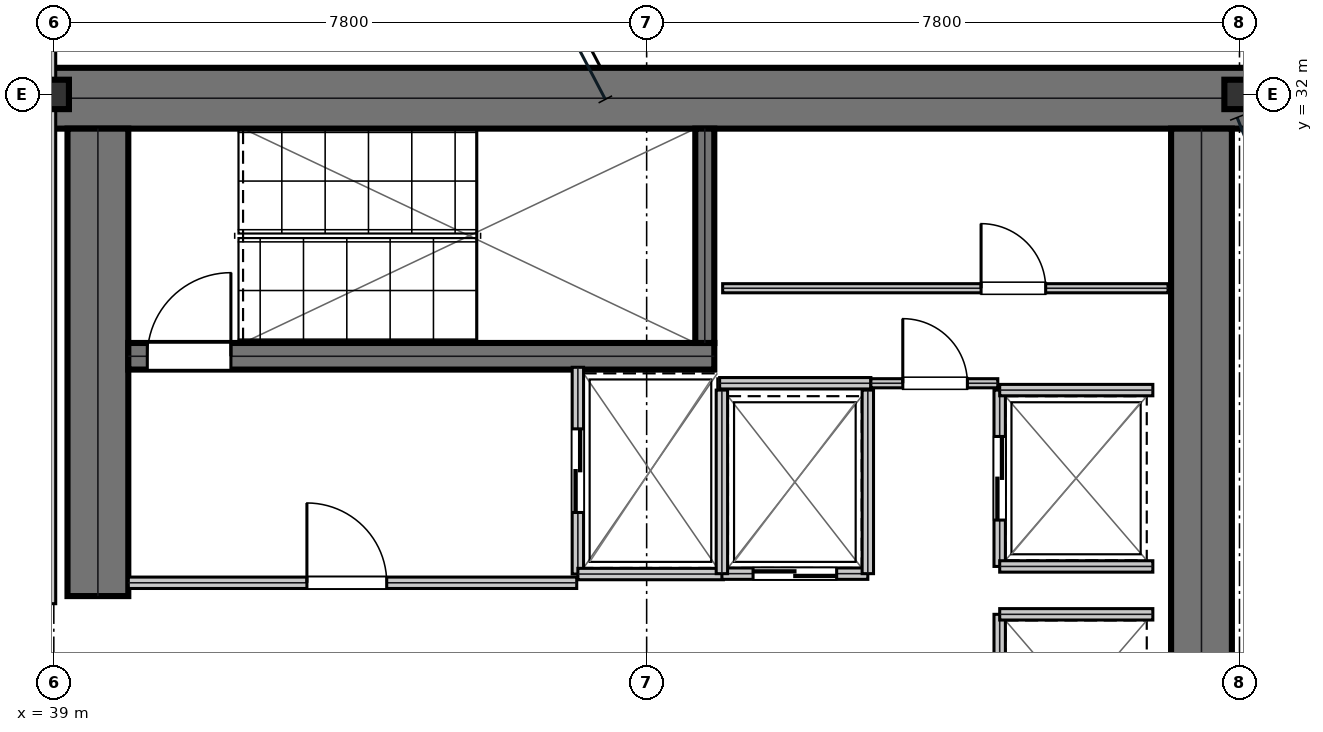
"""IFC4 building model, lengths in metres.
Left out: names, types, materials, properties, quantities, classifications, styles, units other than length and angle.
Written with IfcOpenShell. Run it as: python <this file> out.ifc"""

import sys

from ifc_helpers import new_model, si_unit, direction, frame, frame_2d, origin, origin_2d, place, context, subcontext, project, spatial, rectangle, i_section, extrude, element, fill, save


model = new_model("IFC4")
c1 = context("Model", 3, precision=1e-05, world=origin(), true_north=direction((0.0, 1.0)))
c2 = subcontext(c1, "Body", "Model", "MODEL_VIEW")
j1 = project(units=[si_unit("LENGTHUNIT", "METRE"), si_unit("PLANEANGLEUNIT", "RADIAN")], contexts=[c1])
p1 = place(None, origin())
s1 = spatial("IfcSite", under=j1, at=p1, CompositionType="ELEMENT")
p2 = place(p1, origin())
s2 = spatial("IfcBuilding", under=s1, at=p2, CompositionType="ELEMENT")
p3 = place(p2, frame((0.0, 0.0, 145.2)))
s3 = spatial("IfcBuildingStorey", under=s2, at=p3, CompositionType="ELEMENT", Elevation=145.2)
p4 = place(p3, frame((38.8, 31.95, 0.0), z_axis=(0.0, 0.0, 1.0), x_axis=(1.0, 0.0, 0.0)))
e1 = element("IfcWall", 1, at=p4, inside=s3, PredefinedType="SHEAR", context=c2, shape_type="SweptSolid", body=[
    extrude(rectangle(XDim=16.0, YDim=0.8, at=frame_2d((8.0, 0.0))), origin(), (0.0, 0.0, 1.0), 3.81),
])
p5 = place(p3, frame((39.58, 25.4, 0.0), z_axis=(0.0, 0.0, 1.0), x_axis=(0.0, 1.0, 0.0)))
e2 = element("IfcWall", 2, at=p5, inside=s3, PredefinedType="SHEAR", context=c2, shape_type="SweptSolid", body=[
    extrude(rectangle(XDim=6.15, YDim=0.8, at=frame_2d((3.075, 0.0))), origin(), (0.0, 0.0, 1.0), 3.81),
])
p6 = place(p3, frame((54.1, 16.45, 0.0), z_axis=(0.0, 0.0, 1.0), x_axis=(0.0, 1.0, 0.0)))
e3 = element("IfcWall", 3, at=p6, inside=s3, PredefinedType="SHEAR", context=c2, shape_type="SweptSolid", body=[
    extrude(rectangle(XDim=15.1, YDim=0.8, at=frame_2d((7.55, 0.0))), origin(), (0.0, 0.0, 1.0), 3.81),
])
p7 = place(p3, frame((39.98, 28.555, 0.0), z_axis=(0.0, 0.0, 1.0), x_axis=(1.0, 0.0, 0.0)))
e4 = element("IfcWall", 4, at=p7, inside=s3, PredefinedType="SHEAR", context=c2, shape_type="SweptSolid", body=[
    extrude(rectangle(XDim=7.71, YDim=0.35, at=frame_2d((3.855, 0.0))), origin(), (0.0, 0.0, 1.0), 3.81),
])
p8 = place(p7, frame((0.25, 0.0, 0.0)))
e5 = element("IfcOpeningElement", 5, at=p8, cuts=e4, PredefinedType="OPENING", context=c2, shape_type="SweptSolid", body=[
    extrude(rectangle(XDim=1.1, YDim=2.15, at=frame_2d((0.55, 1.075))), frame((0.0, 0.185, 0.0), z_axis=(0.0, -1.0, 0.0), x_axis=(1.0, 0.0, 0.0)), (0.0, 0.0, 1.0), 0.37),
])
p9 = place(p3, frame((47.565, 28.73, 0.0), z_axis=(0.0, 0.0, 1.0), x_axis=(0.0, 1.0, 0.0)))
e6 = element("IfcWall", 6, at=p9, inside=s3, PredefinedType="SHEAR", context=c2, shape_type="SweptSolid", body=[
    extrude(rectangle(XDim=2.82, YDim=0.25, at=frame_2d((1.41, 0.0))), origin(), (0.0, 0.0, 1.0), 3.81),
])
for number, where, z_axis, x_axis in (
    (7, (39.0, 32.0, 0.0), (0.0, 0.0, 1.0), (1.0, 0.0, 0.0)),
    (8, (54.6, 32.0, 0.0), (0.0, 0.0, 1.0), (1.0, 0.0, 0.0)),
):
    element("IfcColumn", number, at=place(p3, frame(where, z_axis=z_axis, x_axis=x_axis)), inside=s3, PredefinedType="COLUMN", context=c2, shape_type="SweptSolid", body=[
        extrude(i_section(OverallWidth=0.398, OverallDepth=0.387, WebThickness=0.021, FlangeThickness=0.033, at=origin_2d()), origin(), (0.0, 0.0, 1.0), 4.044),
    ])
p10 = place(p3, frame((39.98, 25.575, 0.0), z_axis=(0.0, 0.0, 1.0), x_axis=(1.0, 0.0, 0.0)))
e9 = element("IfcWall", 9, at=p10, inside=s3, PredefinedType="PARTITIONING", context=c2, shape_type="SweptSolid", body=[
    extrude(rectangle(XDim=5.9, YDim=0.15, at=frame_2d((2.95, 0.0))), origin(), (0.0, 0.0, 1.0), 3.81),
])
p11 = place(p10, frame((2.35, 0.0, 0.0)))
e10 = element("IfcOpeningElement", 10, at=p11, cuts=e9, PredefinedType="OPENING", context=c2, shape_type="SweptSolid", body=[
    extrude(rectangle(XDim=1.05, YDim=2.15, at=frame_2d((0.525, 1.075))), frame((0.0, 0.085, 0.0), z_axis=(0.0, -1.0, 0.0), x_axis=(1.0, 0.0, 0.0)), (0.0, 0.0, 1.0), 0.17),
])
p12 = place(p3, frame((45.895, 25.69, 0.0), z_axis=(0.0, 0.0, 1.0), x_axis=(0.0, 1.0, 0.0)))
e11 = element("IfcWall", 11, at=p12, inside=s3, PredefinedType="PARTITIONING", context=c2, shape_type="SweptSolid", body=[
    extrude(rectangle(XDim=2.72, YDim=0.15, at=frame_2d((1.36, 0.0))), origin(), (0.0, 0.0, 1.0), 3.81),
])
p13 = place(p12, frame((0.81, 0.0, 0.0)))
e12 = element("IfcOpeningElement", 12, at=p13, cuts=e11, PredefinedType="OPENING", context=c2, shape_type="SweptSolid", body=[
    extrude(rectangle(XDim=1.1, YDim=2.15, at=frame_2d((0.55, 1.075))), frame((0.0, 0.085, 0.0), z_axis=(0.0, -1.0, 0.0), x_axis=(1.0, 0.0, 0.0)), (0.0, 0.0, 1.0), 0.17),
])
p14 = place(p3, frame((45.895, 25.69, 0.0), z_axis=(0.0, 0.0, 1.0), x_axis=(1.0, 0.0, 0.0)))
e13 = element("IfcWall", 13, at=p14, inside=s3, PredefinedType="PARTITIONING", context=c2, shape_type="SweptSolid", body=[
    extrude(rectangle(XDim=1.915, YDim=0.15, at=frame_2d((0.958, 0.0))), origin(), (0.0, 0.0, 1.0), 3.81),
])
p15 = place(p3, frame((47.79, 25.695, 0.0), z_axis=(0.0, 0.0, 1.0), x_axis=(1.0, 0.0, 0.0)))
e14 = element("IfcWall", 14, at=p15, inside=s3, PredefinedType="PARTITIONING", context=c2, shape_type="SweptSolid", body=[
    extrude(rectangle(XDim=1.92, YDim=0.15, at=frame_2d((0.96, 0.0))), origin(), (0.0, 0.0, 1.0), 3.81),
])
p16 = place(p15, frame((0.41, 0.0, 0.0)))
e15 = element("IfcOpeningElement", 15, at=p16, cuts=e14, PredefinedType="OPENING", context=c2, shape_type="SweptSolid", body=[
    extrude(rectangle(XDim=1.1, YDim=2.15, at=frame_2d((0.55, 1.075))), frame((0.0, 0.085, 0.0), z_axis=(0.0, -1.0, 0.0), x_axis=(1.0, 0.0, 0.0)), (0.0, 0.0, 1.0), 0.17),
])
for number, where, z_axis, x_axis in (
    (16, (47.79, 25.695, 0.0), (0.0, 0.0, 1.0), (0.0, 1.0, 0.0)),
    (17, (49.71, 25.695, 0.0), (0.0, 0.0, 1.0), (0.0, 1.0, 0.0)),
):
    element("IfcWall", number, at=place(p3, frame(where, z_axis=z_axis, x_axis=x_axis)), inside=s3, PredefinedType="PARTITIONING", context=c2, shape_type="SweptSolid", body=[
        extrude(rectangle(XDim=2.415, YDim=0.15, at=frame_2d((1.208, 0.0))), origin(), (0.0, 0.0, 1.0), 3.81),
    ])
p17 = place(p3, frame((51.445, 25.79, 0.0), z_axis=(0.0, 0.0, 1.0), x_axis=(0.0, 1.0, 0.0)))
e18 = element("IfcWall", 18, at=p17, inside=s3, PredefinedType="PARTITIONING", context=c2, shape_type="SweptSolid", body=[
    extrude(rectangle(XDim=2.32, YDim=0.15, at=frame_2d((1.16, 0.0))), origin(), (0.0, 0.0, 1.0), 3.81),
])
p18 = place(p17, frame((0.61, 0.0, 0.0)))
e19 = element("IfcOpeningElement", 19, at=p18, cuts=e18, PredefinedType="OPENING", context=c2, shape_type="SweptSolid", body=[
    extrude(rectangle(XDim=1.1, YDim=2.15, at=frame_2d((0.55, 1.075))), frame((0.0, 0.085, 0.0), z_axis=(0.0, -1.0, 0.0), x_axis=(1.0, 0.0, 0.0)), (0.0, 0.0, 1.0), 0.17),
])
for number, where, z_axis, x_axis in (
    (20, (51.445, 25.79, 0.0), (0.0, 0.0, 1.0), (1.0, 0.0, 0.0)),
    (21, (51.445, 28.11, 0.0), (0.0, 0.0, 1.0), (1.0, 0.0, 0.0)),
):
    element("IfcWall", number, at=place(p3, frame(where, z_axis=z_axis, x_axis=x_axis)), inside=s3, PredefinedType="PARTITIONING", context=c2, shape_type="SweptSolid", body=[
        extrude(rectangle(XDim=2.015, YDim=0.15, at=frame_2d((1.007, 0.0))), origin(), (0.0, 0.0, 1.0), 3.81),
    ])
p19 = place(p3, frame((51.445, 22.84, 0.0), z_axis=(0.0, 0.0, 1.0), x_axis=(0.0, 1.0, 0.0)))
e22 = element("IfcWall", 22, at=p19, inside=s3, PredefinedType="PARTITIONING", context=c2, shape_type="SweptSolid", body=[
    extrude(rectangle(XDim=2.32, YDim=0.15, at=frame_2d((1.16, 0.0))), origin(), (0.0, 0.0, 1.0), 3.81),
])
p20 = place(p3, frame((51.445, 25.16, 0.0), z_axis=(0.0, 0.0, 1.0), x_axis=(1.0, 0.0, 0.0)))
e23 = element("IfcWall", 23, at=p20, inside=s3, PredefinedType="PARTITIONING", context=c2, shape_type="SweptSolid", body=[
    extrude(rectangle(XDim=2.015, YDim=0.15, at=frame_2d((1.007, 0.0))), origin(), (0.0, 0.0, 1.0), 3.81),
])
p21 = place(p3, frame((47.76, 28.2, 0.0), z_axis=(0.0, 0.0, 1.0), x_axis=(1.0, 0.0, 0.0)))
e24 = element("IfcWall", 24, at=p21, inside=s3, PredefinedType="PARTITIONING", context=c2, shape_type="SweptSolid", body=[
    extrude(rectangle(XDim=1.99, YDim=0.15, at=frame_2d((0.995, 0.0))), origin(), (0.0, 0.0, 1.0), 3.81),
])
p22 = place(p3, frame((49.75, 28.2, 0.0), z_axis=(0.0, 0.0, 1.0), x_axis=(1.0, 0.0, 0.0)))
e25 = element("IfcWall", 25, at=p22, inside=s3, PredefinedType="PARTITIONING", context=c2, shape_type="SweptSolid", body=[
    extrude(rectangle(XDim=1.67, YDim=0.12, at=frame_2d((0.835, 0.0))), origin(), (0.0, 0.0, 1.0), 3.81),
])
p23 = place(p22, frame((0.42, 0.0, 0.0)))
e26 = element("IfcOpeningElement", 26, at=p23, cuts=e25, PredefinedType="OPENING", context=c2, shape_type="SweptSolid", body=[
    extrude(rectangle(XDim=0.85, YDim=2.15, at=frame_2d((0.425, 1.075))), frame((0.0, 0.07, 0.0), z_axis=(0.0, -1.0, 0.0), x_axis=(1.0, 0.0, 0.0)), (0.0, 0.0, 1.0), 0.14),
])
p24 = place(p3, frame((47.8, 29.45, 0.0), z_axis=(0.0, 0.0, 1.0), x_axis=(1.0, 0.0, 0.0)))
e27 = element("IfcWall", 27, at=p24, inside=s3, PredefinedType="PARTITIONING", context=c2, shape_type="SweptSolid", body=[
    extrude(rectangle(XDim=5.86, YDim=0.12, at=frame_2d((2.93, 0.0))), origin(), (0.0, 0.0, 1.0), 3.81),
])
p25 = place(p24, frame((3.4, 0.0, 0.0)))
e28 = element("IfcOpeningElement", 28, at=p25, cuts=e27, PredefinedType="OPENING", context=c2, shape_type="SweptSolid", body=[
    extrude(rectangle(XDim=0.85, YDim=2.15, at=frame_2d((0.425, 1.075))), frame((0.0, 0.07, 0.0), z_axis=(0.0, -1.0, 0.0), x_axis=(1.0, 0.0, 0.0)), (0.0, 0.0, 1.0), 0.14),
])
p26 = place(p3, frame((38.95, 25.3, 0.0), z_axis=(0.0, 0.0, 1.0), x_axis=(0.0, 1.0, 0.0)))
e29 = element("IfcWall", 29, at=p26, inside=s3, PredefinedType="PARTITIONING", context=c2, shape_type="SweptSolid", body=[
    extrude(rectangle(XDim=8.2, YDim=0.15, at=frame_2d((4.1, 0.0))), origin(), (0.0, 0.0, 1.0), 3.19),
])
p27 = place(p11, origin())
e30 = element("IfcDoor", 30, at=p27, inside=s3, OperationType="SINGLE_SWING_LEFT", PredefinedType="DOOR", context=c2, shape_type="SweptSolid", body=[
    extrude(rectangle(XDim=1.05, YDim=2.15, at=frame_2d((0.525, 1.075))), frame((0.0, 0.025, 0.0), z_axis=(0.0, -1.0, 0.0), x_axis=(1.0, 0.0, 0.0)), (0.0, 0.0, 1.0), 0.05),
])
fill(e10, e30)
p28 = place(p13, frame((1.1, 0.0, 0.0), z_axis=(0.0, 0.0, 1.0), x_axis=(-1.0, 0.0, 0.0)))
e31 = element("IfcDoor", 31, at=p28, inside=s3, OperationType="DOUBLE_DOOR_SLIDING", PredefinedType="DOOR", context=c2, shape_type="SweptSolid", body=[
    extrude(rectangle(XDim=1.1, YDim=2.15, at=frame_2d((0.55, 1.075))), frame((0.0, 0.025, 0.0), z_axis=(0.0, -1.0, 0.0), x_axis=(1.0, 0.0, 0.0)), (0.0, 0.0, 1.0), 0.05),
])
fill(e12, e31)
p29 = place(p16, frame((1.1, 0.0, 0.0), z_axis=(0.0, 0.0, 1.0), x_axis=(-1.0, 0.0, 0.0)))
e32 = element("IfcDoor", 32, at=p29, inside=s3, OperationType="DOUBLE_DOOR_SLIDING", PredefinedType="DOOR", context=c2, shape_type="SweptSolid", body=[
    extrude(rectangle(XDim=1.1, YDim=2.15, at=frame_2d((0.55, 1.075))), frame((0.0, 0.025, 0.0), z_axis=(0.0, -1.0, 0.0), x_axis=(1.0, 0.0, 0.0)), (0.0, 0.0, 1.0), 0.05),
])
fill(e15, e32)
p30 = place(p18, frame((1.1, 0.0, 0.0), z_axis=(0.0, 0.0, 1.0), x_axis=(-1.0, 0.0, 0.0)))
e33 = element("IfcDoor", 33, at=p30, inside=s3, OperationType="DOUBLE_DOOR_SLIDING", PredefinedType="DOOR", context=c2, shape_type="SweptSolid", body=[
    extrude(rectangle(XDim=1.1, YDim=2.15, at=frame_2d((0.55, 1.075))), frame((0.0, 0.025, 0.0), z_axis=(0.0, -1.0, 0.0), x_axis=(1.0, 0.0, 0.0)), (0.0, 0.0, 1.0), 0.05),
])
fill(e19, e33)
p31 = place(p23, origin())
e34 = element("IfcDoor", 34, at=p31, inside=s3, OperationType="SINGLE_SWING_LEFT", PredefinedType="DOOR", context=c2, shape_type="SweptSolid", body=[
    extrude(rectangle(XDim=0.85, YDim=2.15, at=frame_2d((0.425, 1.075))), frame((0.0, 0.025, 0.0), z_axis=(0.0, -1.0, 0.0), x_axis=(1.0, 0.0, 0.0)), (0.0, 0.0, 1.0), 0.05),
])
fill(e26, e34)
p32 = place(p25, origin())
e35 = element("IfcDoor", 35, at=p32, inside=s3, OperationType="SINGLE_SWING_LEFT", PredefinedType="DOOR", context=c2, shape_type="SweptSolid", body=[
    extrude(rectangle(XDim=0.85, YDim=2.15, at=frame_2d((0.425, 1.075))), frame((0.0, 0.025, 0.0), z_axis=(0.0, -1.0, 0.0), x_axis=(1.0, 0.0, 0.0)), (0.0, 0.0, 1.0), 0.05),
])
fill(e28, e35)
p33 = place(p8, origin())
e36 = element("IfcDoor", 36, at=p33, inside=s3, OperationType="SINGLE_SWING_RIGHT", PredefinedType="DOOR", context=c2, shape_type="SweptSolid", body=[
    extrude(rectangle(XDim=1.1, YDim=2.15, at=frame_2d((0.55, 1.075))), frame((0.0, 0.025, 0.0), z_axis=(0.0, -1.0, 0.0), x_axis=(1.0, 0.0, 0.0)), (0.0, 0.0, 1.0), 0.05),
])
fill(e5, e36)
save(model, sys.argv[1])
